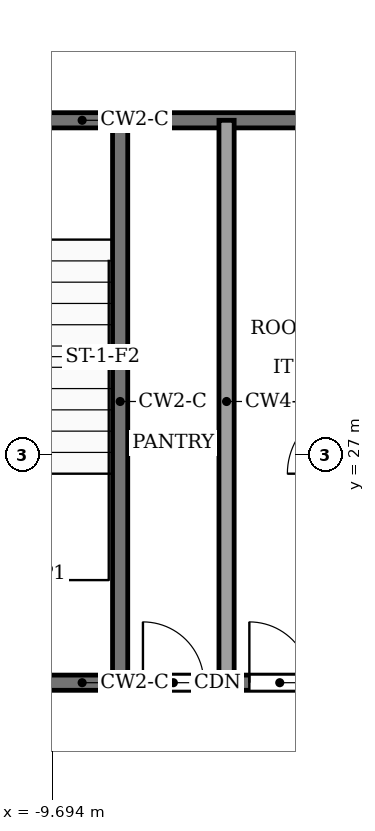
"""IFC4 building model, lengths in metres.
Left out: names, types, materials, properties, quantities, classifications, styles, units other than length and angle.
Written with IfcOpenShell. Run it as: python <this file> out.ifc"""

import sys

from ifc_helpers import new_model, si_unit, direction, frame, frame_2d, origin, place, context, subcontext, project, spatial, rectangle, extrude, element, fill, save


model = new_model("IFC4")
c1 = context("Model", 3, precision=1e-05, world=origin(), true_north=direction((0.0, 1.0)))
c2 = subcontext(c1, "Body", "Model", "MODEL_VIEW")
j1 = project(units=[si_unit("LENGTHUNIT", "METRE"), si_unit("PLANEANGLEUNIT", "RADIAN")], contexts=[c1])
p1 = place(None, origin())
s1 = spatial("IfcSite", under=j1, at=p1, CompositionType="ELEMENT")
p2 = place(p1, origin())
s2 = spatial("IfcBuilding", under=s1, at=p2, CompositionType="ELEMENT")
p3 = place(p2, frame((0.0, 0.0, 250.0)))
s3 = spatial("IfcBuildingStorey", under=s2, at=p3, CompositionType="ELEMENT", Elevation=250.0)
p4 = place(p3, frame((-12.6, 24.0, 0.0), z_axis=(0.0, 0.0, 1.0), x_axis=(1.0, 0.0, 0.0)))
e1 = element("IfcWall", 1, at=p4, inside=s3, PredefinedType="PARTITIONING", context=c2, shape_type="SweptSolid", body=[
    extrude(rectangle(XDim=6.6, YDim=0.2, at=frame_2d((3.3, 0.0))), origin(), (0.0, 0.0, 1.0), 3.87),
])
p5 = place(p4, frame((4.1, 0.0, 0.0)))
e2 = element("IfcOpeningElement", 2, at=p5, cuts=e1, PredefinedType="OPENING", context=c2, shape_type="SweptSolid", body=[
    extrude(rectangle(XDim=0.8, YDim=2.1, at=frame_2d((0.4, 1.05))), frame((0.0, 0.11, 0.0), z_axis=(0.0, -1.0, 0.0), x_axis=(1.0, 0.0, 0.0)), (0.0, 0.0, 1.0), 0.22),
])
p6 = place(p4, frame((5.5, 0.0, 0.0)))
e3 = element("IfcOpeningElement", 3, at=p6, cuts=e1, PredefinedType="OPENING", context=c2, shape_type="SweptSolid", body=[
    extrude(rectangle(XDim=0.8, YDim=2.1, at=frame_2d((0.4, 1.05))), frame((0.0, 0.11, 0.0), z_axis=(0.0, -1.0, 0.0), x_axis=(1.0, 0.0, 0.0)), (0.0, 0.0, 1.0), 0.22),
])
p7 = place(p3, frame((-12.6, 31.4, 0.0), z_axis=(0.0, 0.0, 1.0), x_axis=(1.0, 0.0, 0.0)))
e4 = element("IfcWall", 4, at=p7, inside=s3, PredefinedType="PARTITIONING", context=c2, shape_type="SweptSolid", body=[
    extrude(rectangle(XDim=6.6, YDim=0.2, at=frame_2d((3.3, 0.0))), origin(), (0.0, 0.0, 1.0), 3.87),
])
p8 = place(p7, frame((1.0, 0.0, 0.0)))
e5 = element("IfcOpeningElement", 5, at=p8, cuts=e4, PredefinedType="OPENING", context=c2, shape_type="SweptSolid", body=[
    extrude(rectangle(XDim=1.2, YDim=2.2, at=frame_2d((0.6, 1.1))), frame((0.0, 0.11, 0.0), z_axis=(0.0, -1.0, 0.0), x_axis=(1.0, 0.0, 0.0)), (0.0, 0.0, 1.0), 0.22),
])
for number, where, z_axis, x_axis in (
    (6, (-8.8, 24.0, 0.0), (0.0, 0.0, 1.0), (0.0, 1.0, 0.0)),
    (7, (-7.4, 24.0, 0.0), (0.0, 0.0, 1.0), (0.0, 1.0, 0.0)),
):
    element("IfcWall", number, at=place(p3, frame(where, z_axis=z_axis, x_axis=x_axis)), inside=s3, PredefinedType="PARTITIONING", context=c2, shape_type="SweptSolid", body=[
        extrude(rectangle(XDim=7.4, YDim=0.2, at=frame_2d((3.7, 0.0))), origin(), (0.0, 0.0, 1.0), 3.87),
    ])
p9 = place(p5, origin())
e8 = element("IfcDoor", 8, at=p9, inside=s3, OperationType="SINGLE_SWING_LEFT", PredefinedType="DOOR", context=c2, shape_type="SweptSolid", body=[
    extrude(rectangle(XDim=0.8, YDim=2.1, at=frame_2d((0.4, 1.05))), frame((0.0, 0.025, 0.0), z_axis=(0.0, -1.0, 0.0), x_axis=(1.0, 0.0, 0.0)), (0.0, 0.0, 1.0), 0.05),
])
fill(e2, e8)
p10 = place(p6, origin())
e9 = element("IfcDoor", 9, at=p10, inside=s3, OperationType="SINGLE_SWING_RIGHT", PredefinedType="DOOR", context=c2, shape_type="SweptSolid", body=[
    extrude(rectangle(XDim=0.8, YDim=2.1, at=frame_2d((0.4, 1.05))), frame((0.0, 0.025, 0.0), z_axis=(0.0, -1.0, 0.0), x_axis=(1.0, 0.0, 0.0)), (0.0, 0.0, 1.0), 0.05),
])
fill(e3, e9)
save(model, sys.argv[1])
